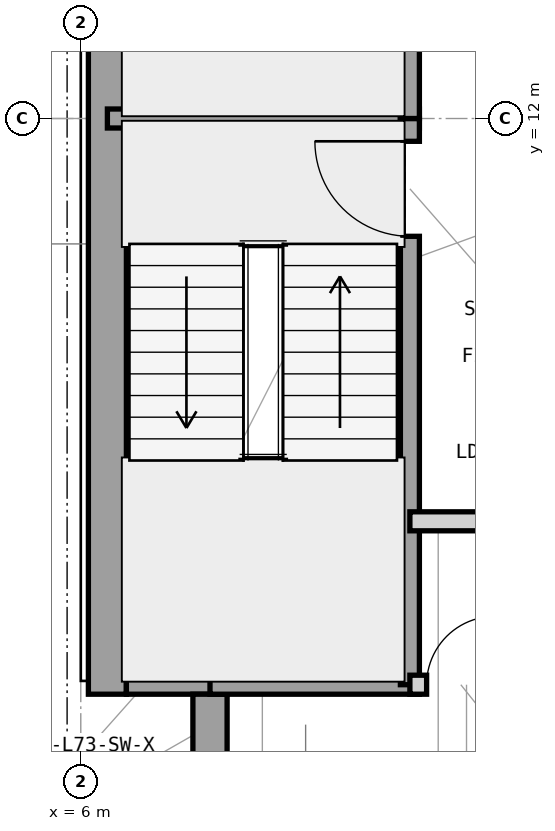
"""IFC4 building model, lengths in metres.
Left out: names, types, materials, properties, quantities, classifications, styles, units other than length and angle.
Written with IfcOpenShell. Run it as: python <this file> out.ifc"""

import sys

from ifc_helpers import new_model, si_unit, direction, frame, frame_2d, origin, place, context, subcontext, project, spatial, rectangle, extrude, element, fill, save


model = new_model("IFC4")
c1 = context("Model", 3, precision=1e-05, world=origin(), true_north=direction((0.0, 1.0)))
c2 = subcontext(c1, "Body", "Model", "MODEL_VIEW")
j1 = project(units=[si_unit("LENGTHUNIT", "METRE"), si_unit("PLANEANGLEUNIT", "RADIAN")], contexts=[c1])
p1 = place(None, origin())
s1 = spatial("IfcSite", under=j1, at=p1, CompositionType="ELEMENT")
p2 = place(p1, origin())
s2 = spatial("IfcBuilding", under=s1, at=p2, CompositionType="ELEMENT")
p3 = place(p2, frame((0.0, 0.0, 297.6)))
s3 = spatial("IfcBuildingStorey", under=s2, at=p3, CompositionType="ELEMENT", Elevation=297.6)
p4 = place(p3, frame((6.35, 4.425, 0.0), z_axis=(0.0, 0.0, 1.0), x_axis=(0.0, 1.0, 0.0)))
e1 = element("IfcWall", 1, at=p4, inside=s3, PredefinedType="SHEAR", context=c2, shape_type="SweptSolid", body=[
    extrude(rectangle(XDim=15.15, YDim=0.5, at=frame_2d((7.575, 0.0))), origin(), (0.0, 0.0, 1.0), 3.9),
])
p5 = place(p3, frame((6.6, 4.65, 0.0), z_axis=(0.0, 0.0, 1.0), x_axis=(1.0, 0.0, 0.0)))
e2 = element("IfcWall", 2, at=p5, inside=s3, PredefinedType="SHEAR", context=c2, shape_type="SweptSolid", body=[
    extrude(rectangle(XDim=1.325, YDim=0.45, at=frame_2d((0.663, 0.0))), origin(), (0.0, 0.0, 1.0), 3.9),
])
p6 = place(p3, frame((7.7, 3.6, 0.0), z_axis=(0.0, 0.0, 1.0), x_axis=(0.0, 1.0, 0.0)))
e3 = element("IfcWall", 3, at=p6, inside=s3, PredefinedType="SHEAR", context=c2, shape_type="SweptSolid", body=[
    extrude(rectangle(XDim=0.825, YDim=0.45, at=frame_2d((0.413, 0.0))), origin(), (0.0, 0.0, 1.0), 3.9),
])
p7 = place(p3, frame((6.35, 12.0, 0.0), z_axis=(0.0, 0.0, 1.0), x_axis=(1.0, 0.0, 0.0)))
e4 = element("IfcWall", 4, at=p7, inside=s3, PredefinedType="SHEAR", context=c2, shape_type="SweptSolid", body=[
    extrude(rectangle(XDim=4.105, YDim=0.25, at=frame_2d((2.052, 0.0))), origin(), (0.0, 0.0, 1.0), 3.9),
])
p8 = place(p3, frame((7.7, 4.55, 0.0), z_axis=(0.0, 0.0, 1.0), x_axis=(1.0, 0.0, 0.0)))
e5 = element("IfcWall", 5, at=p8, inside=s3, PredefinedType="SHEAR", context=c2, shape_type="SweptSolid", body=[
    extrude(rectangle(XDim=2.755, YDim=0.25, at=frame_2d((1.377, 0.0))), origin(), (0.0, 0.0, 1.0), 3.9),
])
p9 = place(p3, frame((10.33, 4.55, 0.0), z_axis=(0.0, 0.0, 1.0), x_axis=(0.0, 1.0, 0.0)))
e6 = element("IfcWall", 6, at=p9, inside=s3, PredefinedType="SHEAR", context=c2, shape_type="SweptSolid", body=[
    extrude(rectangle(XDim=7.45, YDim=0.25, at=frame_2d((3.725, 0.0))), origin(), (0.0, 0.0, 1.0), 3.9),
])
p10 = place(p9, frame((5.9, 0.0, 0.0)))
e7 = element("IfcOpeningElement", 7, at=p10, cuts=e6, PredefinedType="OPENING", context=c2, shape_type="SweptSolid", body=[
    extrude(rectangle(XDim=1.25, YDim=2.2, at=frame_2d((0.625, 1.1))), frame((0.0, 0.135, 0.0), z_axis=(0.0, -1.0, 0.0), x_axis=(1.0, 0.0, 0.0)), (0.0, 0.0, 1.0), 0.27),
])
p11 = place(p3, frame((10.33, 12.0, 0.0), z_axis=(0.0, 0.0, 1.0), x_axis=(0.0, 1.0, 0.0)))
e8 = element("IfcWall", 8, at=p11, inside=s3, PredefinedType="SHEAR", context=c2, shape_type="SweptSolid", body=[
    extrude(rectangle(XDim=7.45, YDim=0.25, at=frame_2d((3.725, 0.0))), origin(), (0.0, 0.0, 1.0), 3.9),
])
p12 = place(p11, frame((5.85, 0.0, 0.0)))
e9 = element("IfcOpeningElement", 9, at=p12, cuts=e8, PredefinedType="OPENING", context=c2, shape_type="SweptSolid", body=[
    extrude(rectangle(XDim=1.25, YDim=2.2, at=frame_2d((0.625, 1.1))), frame((0.0, 0.135, 0.0), z_axis=(0.0, -1.0, 0.0), x_axis=(1.0, 0.0, 0.0)), (0.0, 0.0, 1.0), 0.27),
])
p13 = place(p3, frame((10.33, 4.55, 0.0), z_axis=(0.0, 0.0, 1.0), x_axis=(1.0, 0.0, 0.0)))
e10 = element("IfcWall", 10, at=p13, inside=s3, PredefinedType="PARTITIONING", context=c2, shape_type="SweptSolid", body=[
    extrude(rectangle(XDim=1.49, YDim=0.25, at=frame_2d((0.745, 0.0))), origin(), (0.0, 0.0, 1.0), 3.705),
])
p14 = place(p13, frame((0.22, 0.0, 0.0)))
e11 = element("IfcOpeningElement", 11, at=p14, cuts=e10, PredefinedType="OPENING", context=c2, shape_type="SweptSolid", body=[
    extrude(rectangle(XDim=0.9, YDim=2.1, at=frame_2d((0.45, 1.05))), frame((0.0, 0.135, 0.0), z_axis=(0.0, -1.0, 0.0), x_axis=(1.0, 0.0, 0.0)), (0.0, 0.0, 1.0), 0.27),
])
p15 = place(p3, frame((10.33, 6.7, 0.0), z_axis=(0.0, 0.0, 1.0), x_axis=(1.0, 0.0, 0.0)))
e12 = element("IfcWall", 12, at=p15, inside=s3, PredefinedType="PARTITIONING", context=c2, shape_type="SweptSolid", body=[
    extrude(rectangle(XDim=1.49, YDim=0.25, at=frame_2d((0.745, 0.0))), origin(), (0.0, 0.0, 1.0), 3.354),
])
p16 = place(p10, origin())
e13 = element("IfcDoor", 13, at=p16, inside=s3, OperationType="SINGLE_SWING_RIGHT", PredefinedType="DOOR", context=c2, shape_type="SweptSolid", body=[
    extrude(rectangle(XDim=1.25, YDim=2.2, at=frame_2d((0.625, 1.1))), frame((0.0, 0.025, 0.0), z_axis=(0.0, -1.0, 0.0), x_axis=(1.0, 0.0, 0.0)), (0.0, 0.0, 1.0), 0.05),
])
fill(e7, e13)
p17 = place(p14, origin())
e14 = element("IfcDoor", 14, at=p17, inside=s3, OperationType="SINGLE_SWING_RIGHT", PredefinedType="TRAPDOOR", context=c2, shape_type="SweptSolid", body=[
    extrude(rectangle(XDim=0.9, YDim=2.1, at=frame_2d((0.45, 1.05))), frame((0.0, 0.025, 0.0), z_axis=(0.0, -1.0, 0.0), x_axis=(1.0, 0.0, 0.0)), (0.0, 0.0, 1.0), 0.05),
])
fill(e11, e14)
save(model, sys.argv[1])
